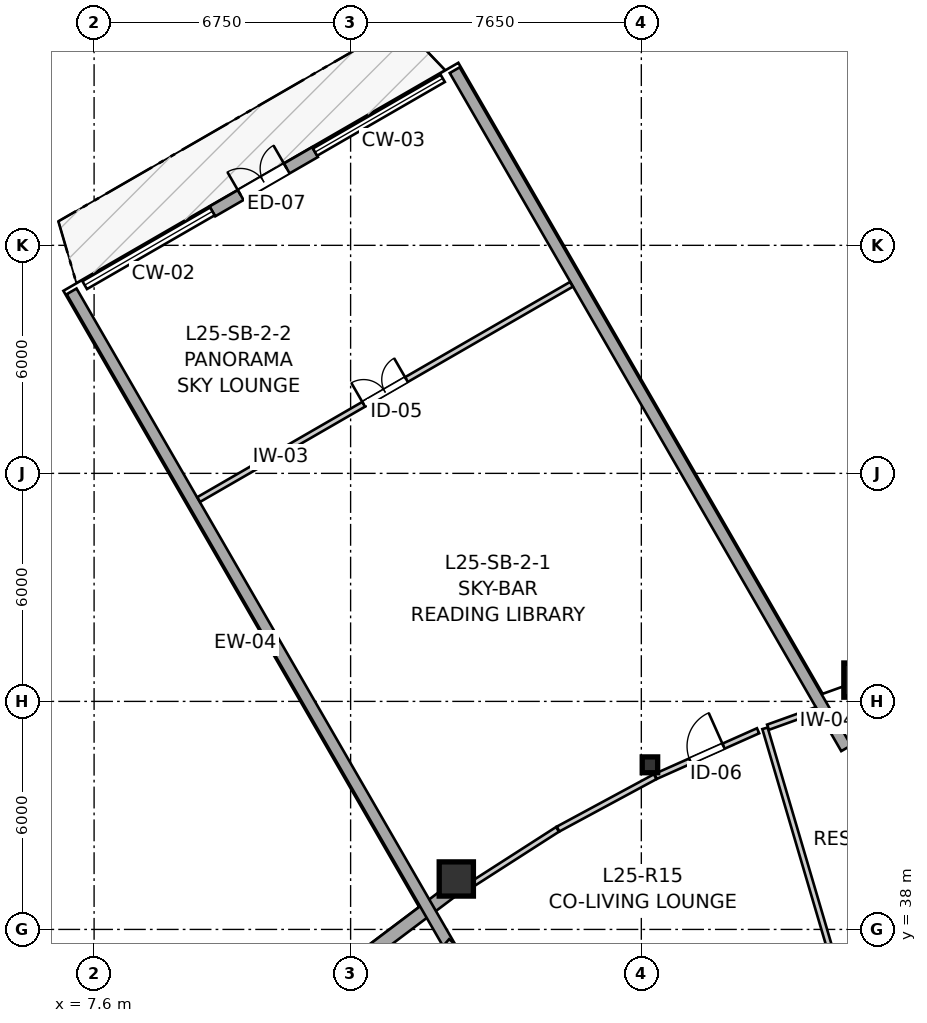
"""IFC4 building model, lengths in metres.
Left out: names, types, materials, properties, quantities, classifications, styles, units other than length and angle.
Written with IfcOpenShell. Run it as: python <this file> out.ifc"""

import sys

from ifc_helpers import new_model, si_unit, direction, frame, frame_2d, origin, origin_2d, place, context, subcontext, project, spatial, rectangle, i_section, extrude, source, transform, mapped, element, fill, save


model = new_model("IFC4")
c1 = context("Model", 3, precision=1e-05, world=origin(), true_north=direction((0.0, 1.0)))
c2 = subcontext(c1, "Body", "Model", "MODEL_VIEW")
j1 = project(units=[si_unit("LENGTHUNIT", "METRE"), si_unit("PLANEANGLEUNIT", "RADIAN")], contexts=[c1])
p1 = place(None, origin())
s1 = spatial("IfcSite", under=j1, at=p1, CompositionType="ELEMENT")
p2 = place(p1, origin())
s2 = spatial("IfcBuilding", under=s1, at=p2, CompositionType="ELEMENT")
p3 = place(p2, frame((0.0, 0.0, 86.4)))
s3 = spatial("IfcBuildingStorey", under=s2, at=p3, CompositionType="ELEMENT", Elevation=86.4)
m1 = source(origin(), c2, "Body", "SweptSolid", [
    extrude(rectangle(XDim=0.9, YDim=0.9, at=origin_2d()), origin(), (0.0, 0.0, 1.0), 2.95),
])
p4 = place(p3, frame((27.779, 44.561, 0.0), z_axis=(0.0, 0.0, 1.0), x_axis=(1.0, 0.0, 0.0)))
e1 = element("IfcColumn", 1, at=p4, inside=s3, PredefinedType="COLUMN", context=c2, shape_type="MappedRepresentation", body=[
    mapped(m1, transform((0.0, 0.0, 0.0), x_axis=(1.0, 0.0, 0.0), y_axis=(0.0, 1.0, 0.0), z_axis=(0.0, 0.0, 1.0), scale=1.0)),
])
m2 = source(origin(), c2, "Body", "SweptSolid", [
    extrude(i_section(OverallWidth=0.406, OverallDepth=0.416, WebThickness=0.027, FlangeThickness=0.044, FilletRadius=0.015, at=origin_2d()), origin(), (0.0, 0.0, 1.0), 2.95),
])
p5 = place(p3, frame((22.227, 42.331, 0.0), z_axis=(0.0, 0.0, 1.0), x_axis=(1.0, 0.0, 0.0)))
e2 = element("IfcColumn", 2, at=p5, inside=s3, PredefinedType="PILASTER", context=c2, shape_type="MappedRepresentation", body=[
    mapped(m2, transform((0.0, 0.0, 0.0), x_axis=(1.0, 0.0, 0.0), y_axis=(0.0, 1.0, 0.0), z_axis=(0.0, 0.0, 1.0), scale=1.0)),
])
p6 = place(p3, frame((17.131, 39.327, 0.0), z_axis=(0.0, 0.0, 1.0), x_axis=(1.0, 0.0, 0.0)))
e3 = element("IfcColumn", 3, at=p6, inside=s3, PredefinedType="COLUMN", context=c2, shape_type="MappedRepresentation", body=[
    mapped(m1, transform((0.0, 0.0, 0.0), x_axis=(1.0, 0.0, 0.0), y_axis=(0.0, 1.0, 0.0), z_axis=(0.0, 0.0, 1.0), scale=1.0)),
])
p7 = place(p3, frame((17.057, 39.052, 0.0), z_axis=(0.0, 0.0, 1.0), x_axis=(-0.798379678642, -0.602154372841, 0.0)))
e4 = element("IfcWall", 4, at=p7, inside=s3, PredefinedType="SOLIDWALL", context=c2, shape_type="SweptSolid", body=[
    extrude(rectangle(XDim=2.79, YDim=0.35, at=frame_2d((1.395, 0.0))), origin(), (0.0, 0.0, 1.0), 2.48),
])
for number, where, z_axis, x_axis in (
    (5, (17.31, 36.946, 0.0), (0.0, 0.0, 1.0), (-0.5, 0.866, 0.0)),
    (6, (27.39, 42.766, 0.0), (0.0, 0.0, 1.0), (-0.5, 0.866, 0.0)),
):
    element("IfcWall", number, at=place(p3, frame(where, z_axis=z_axis, x_axis=x_axis)), inside=s3, PredefinedType="SOLIDWALL", context=c2, shape_type="SweptSolid", body=[
        extrude(rectangle(XDim=20.603, YDim=0.3, at=frame_2d((10.302, 0.0))), origin(), (0.0, 0.0, 1.0), 2.13),
    ])
p8 = place(p3, frame((10.712, 56.893, 0.0), z_axis=(0.0, 0.0, 1.0), x_axis=(0.866029224906, 0.499993381564, 0.0)))
e7 = element("IfcWall", 7, at=p8, inside=s3, PredefinedType="SOLIDWALL", context=c2, shape_type="SweptSolid", body=[
    extrude(rectangle(XDim=3.12, YDim=0.3, at=frame_2d((1.56, 0.0))), origin(), (0.0, 0.0, 1.0), 2.3),
])
p9 = place(p8, frame((0.86, 0.0, 0.0)))
e8 = element("IfcOpeningElement", 8, at=p9, cuts=e7, PredefinedType="OPENING", context=c2, shape_type="SweptSolid", body=[
    extrude(rectangle(XDim=1.4, YDim=2.15, at=frame_2d((0.7, 1.075))), frame((0.0, 0.16, 0.0), z_axis=(0.0, -1.0, 0.0), x_axis=(1.0, 0.0, 0.0)), (0.0, 0.0, 1.0), 0.32),
])
p10 = place(p3, frame((10.353, 49.312, 0.0), z_axis=(0.0, 0.0, 1.0), x_axis=(0.866036235619, 0.499981238243, 0.0)))
e9 = element("IfcWall", 9, at=p10, inside=s3, PredefinedType="PARTITIONING", context=c2, shape_type="SweptSolid", body=[
    extrude(rectangle(XDim=11.324, YDim=0.145, at=frame_2d((5.662, 0.0))), origin(), (0.0, 0.0, 1.0), 2.383),
])
p11 = place(p10, frame((5.012, 0.0, 0.0)))
e10 = element("IfcOpeningElement", 10, at=p11, cuts=e9, PredefinedType="OPENING", context=c2, shape_type="SweptSolid", body=[
    extrude(rectangle(XDim=1.3, YDim=2.1, at=frame_2d((0.65, 1.05))), frame((0.0, 0.083, 0.0), z_axis=(0.0, -1.0, 0.0), x_axis=(1.0, 0.0, 0.0)), (0.0, 0.0, 1.0), 0.165),
])
p12 = place(p3, frame((22.377, 42.026, 0.0), z_axis=(0.0, 0.0, 1.0), x_axis=(0.913387960111, 0.407090204162, 0.0)))
e11 = element("IfcWall", 11, at=p12, inside=s3, PredefinedType="PARTITIONING", context=c2, shape_type="SweptSolid", body=[
    extrude(rectangle(XDim=2.951, YDim=0.145, at=frame_2d((1.475, 0.0))), origin(), (0.0, 0.0, 1.0), 2.468),
])
p13 = place(p12, frame((0.995, 0.0, 0.0)))
e12 = element("IfcOpeningElement", 12, at=p13, cuts=e11, PredefinedType="OPENING", context=c2, shape_type="SweptSolid", body=[
    extrude(rectangle(XDim=0.96, YDim=2.1, at=frame_2d((0.48, 1.05))), frame((0.0, 0.083, 0.0), z_axis=(0.0, -1.0, 0.0), x_axis=(1.0, 0.0, 0.0)), (0.0, 0.0, 1.0), 0.165),
])
p14 = place(p3, frame((16.895, 37.69, 0.0), z_axis=(0.0, 0.0, 1.0), x_axis=(0.754854710059, -0.655892038907, 0.0)))
e13 = element("IfcWall", 13, at=p14, inside=s3, PredefinedType="PARTITIONING", context=c2, shape_type="SweptSolid", body=[
    extrude(rectangle(XDim=6.811, YDim=0.145, at=frame_2d((3.406, 0.0))), origin(), (0.0, 0.0, 1.0), 2.118),
])
p15 = place(p3, frame((25.254, 43.292, 0.0), z_axis=(0.0, 0.0, 1.0), x_axis=(0.282661880608, -0.959219610543, 0.0)))
e14 = element("IfcWall", 14, at=p15, inside=s3, PredefinedType="PARTITIONING", context=c2, shape_type="SweptSolid", body=[
    extrude(rectangle(XDim=7.041, YDim=0.145, at=frame_2d((3.521, 0.0))), origin(), (0.0, 0.0, 1.0), 2.95),
])
p16 = place(p3, frame((17.326, 39.048, 0.0), z_axis=(0.0, 0.0, 1.0), x_axis=(0.841527071554, 0.540214945963, 0.0)))
e15 = element("IfcWall", 15, at=p16, inside=s3, PredefinedType="PARTITIONING", context=c2, shape_type="SweptSolid", body=[
    extrude(rectangle(XDim=2.934, YDim=0.145, at=frame_2d((1.467, 0.0))), origin(), (0.0, 0.0, 1.0), 2.468),
])
p17 = place(p3, frame((19.808, 40.64, 0.0), z_axis=(0.0, 0.0, 1.0), x_axis=(0.880106382364, 0.474776532404, 0.0)))
e16 = element("IfcWall", 16, at=p17, inside=s3, PredefinedType="PARTITIONING", context=c2, shape_type="SweptSolid", body=[
    extrude(rectangle(XDim=2.904, YDim=0.145, at=frame_2d((1.452, 0.0))), origin(), (0.0, 0.0, 1.0), 2.468),
])
p18 = place(p3, frame((25.334, 43.321, 0.0), z_axis=(0.0, 0.0, 1.0), x_axis=(0.940956330278, 0.3385279671, 0.0)))
e17 = element("IfcWall", 17, at=p18, inside=s3, PredefinedType="PARTITIONING", context=c2, shape_type="SweptSolid", body=[
    extrude(rectangle(XDim=1.354, YDim=0.145, at=frame_2d((0.677, 0.0))), origin(), (0.0, 0.0, 1.0), 2.468),
])
m3 = source(origin(), c2, "Body", "SweptSolid", [
    extrude(rectangle(XDim=1.4, YDim=2.15, at=frame_2d((0.7, 1.075))), frame((0.0, 0.025, 0.0), z_axis=(0.0, -1.0, 0.0), x_axis=(1.0, 0.0, 0.0)), (0.0, 0.0, 1.0), 0.05),
])
p19 = place(p9, origin())
e18 = element("IfcDoor", 18, at=p19, inside=s3, OperationType="DOUBLE_DOOR_SINGLE_SWING", PredefinedType="DOOR", context=c2, shape_type="MappedRepresentation", body=[
    mapped(m3, transform((0.0, 0.0, 0.0), x_axis=(1.0, 0.0, 0.0), y_axis=(0.0, 1.0, 0.0), z_axis=(0.0, 0.0, 1.0), scale=1.0)),
])
fill(e8, e18)
m4 = source(origin(), c2, "Body", "SweptSolid", [
    extrude(rectangle(XDim=1.3, YDim=2.1, at=frame_2d((0.65, 1.05))), frame((0.0, 0.025, 0.0), z_axis=(0.0, -1.0, 0.0), x_axis=(1.0, 0.0, 0.0)), (0.0, 0.0, 1.0), 0.05),
])
p20 = place(p11, origin())
e19 = element("IfcDoor", 19, at=p20, inside=s3, OperationType="DOUBLE_DOOR_SINGLE_SWING", PredefinedType="DOOR", context=c2, shape_type="MappedRepresentation", body=[
    mapped(m4, transform((0.0, 0.0, 0.0), x_axis=(1.0, 0.0, 0.0), y_axis=(0.0, 1.0, 0.0), z_axis=(0.0, 0.0, 1.0), scale=1.0)),
])
fill(e10, e19)
m5 = source(origin(), c2, "Body", "SweptSolid", [
    extrude(rectangle(XDim=0.96, YDim=2.1, at=frame_2d((0.48, 1.05))), frame((0.0, 0.025, 0.0), z_axis=(0.0, -1.0, 0.0), x_axis=(1.0, 0.0, 0.0)), (0.0, 0.0, 1.0), 0.05),
])
p21 = place(p13, origin())
e20 = element("IfcDoor", 20, at=p21, inside=s3, OperationType="SINGLE_SWING_RIGHT", PredefinedType="DOOR", context=c2, shape_type="MappedRepresentation", body=[
    mapped(m5, transform((0.0, 0.0, 0.0), x_axis=(1.0, 0.0, 0.0), y_axis=(0.0, 1.0, 0.0), z_axis=(0.0, 0.0, 1.0), scale=1.0)),
])
fill(e12, e20)
save(model, sys.argv[1])
